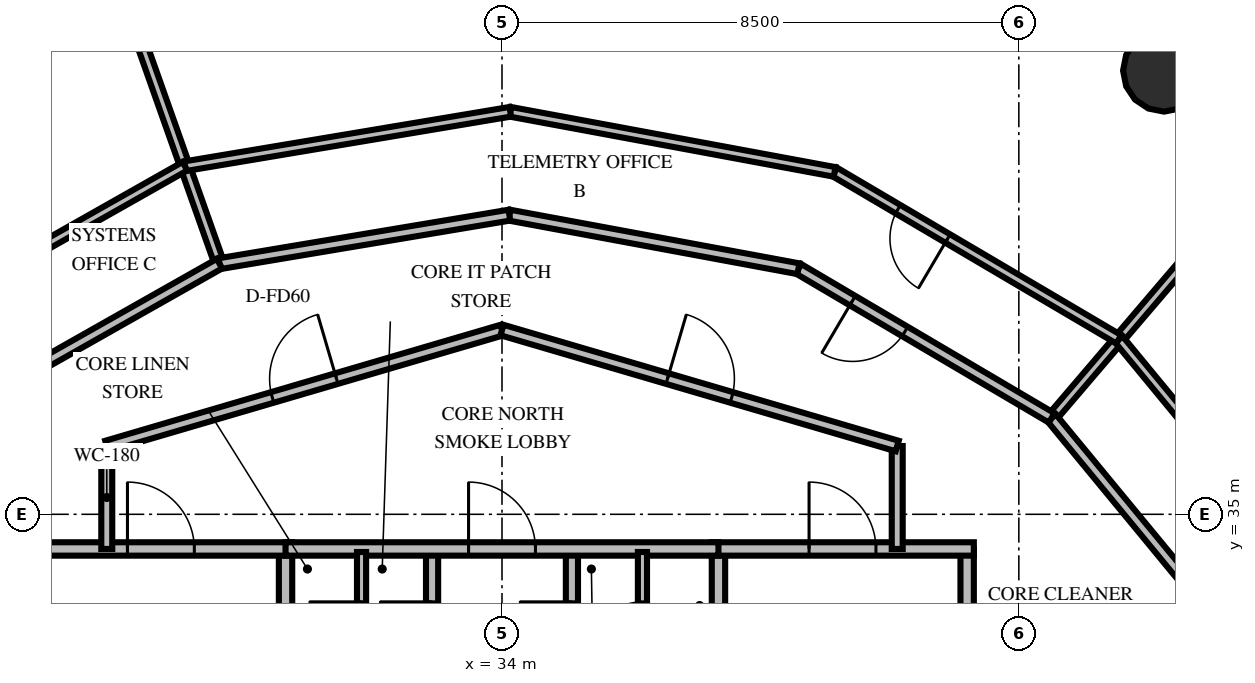
"""IFC4 building model, lengths in metres.
Left out: names, types, materials, properties, quantities, classifications, styles, units other than length and angle.
Written with IfcOpenShell. Run it as: python <this file> out.ifc"""

import sys

from ifc_helpers import new_model, si_unit, direction, frame, frame_2d, origin, origin_2d, place, context, subcontext, project, spatial, rectangle, circle, extrude, element, fill, save


model = new_model("IFC4")
c1 = context("Model", 3, precision=1e-05, world=origin(), true_north=direction((0.0, 1.0)))
c2 = subcontext(c1, "Body", "Model", "MODEL_VIEW")
j1 = project(units=[si_unit("LENGTHUNIT", "METRE"), si_unit("PLANEANGLEUNIT", "RADIAN")], contexts=[c1])
p1 = place(None, origin())
s1 = spatial("IfcSite", under=j1, at=p1, CompositionType="ELEMENT")
p2 = place(p1, origin())
s2 = spatial("IfcBuilding", under=s1, at=p2, CompositionType="ELEMENT")
p3 = place(p2, frame((0.0, 0.0, 72.0)))
s3 = spatial("IfcBuildingStorey", under=s2, at=p3, CompositionType="ELEMENT", Elevation=72.0)
p4 = place(p3, frame((44.889, 42.297, 0.0), z_axis=(0.0, 0.0, 1.0), x_axis=(1.0, 0.0, 0.0)))
e1 = element("IfcColumn", 1, at=p4, inside=s3, PredefinedType="COLUMN", context=c2, shape_type="SweptSolid", body=[
    extrude(circle(Radius=0.675, at=origin_2d()), origin(), (0.0, 0.0, 1.0), 4.2),
])
p5 = place(p3, frame((30.44, 30.05, 0.0), z_axis=(0.0, 0.0, 1.0), x_axis=(0.0, 1.0, 0.0)))
e2 = element("IfcWall", 2, at=p5, inside=s3, PredefinedType="SOLIDWALL", context=c2, shape_type="SweptSolid", body=[
    extrude(rectangle(XDim=4.38, YDim=0.22, at=frame_2d((2.19, 0.0))), origin(), (0.0, 0.0, 1.0), 3.0),
])
p6 = place(p5, frame((0.8, 0.0, 0.0)))
e3 = element("IfcOpeningElement", 3, at=p6, cuts=e2, PredefinedType="OPENING", context=c2, shape_type="SweptSolid", body=[
    extrude(rectangle(XDim=1.05, YDim=2.1, at=frame_2d((0.525, 1.05))), frame((0.0, 0.12, 0.0), z_axis=(0.0, -1.0, 0.0), x_axis=(1.0, 0.0, 0.0)), (0.0, 0.0, 1.0), 0.24),
])
p7 = place(p3, frame((26.24, 34.43, 0.0), z_axis=(0.0, 0.0, 1.0), x_axis=(1.0, 0.0, 0.0)))
e4 = element("IfcWall", 4, at=p7, inside=s3, PredefinedType="SOLIDWALL", context=c2, shape_type="SweptSolid", body=[
    extrude(rectangle(XDim=4.31, YDim=0.22, at=frame_2d((2.155, 0.0))), origin(), (0.0, 0.0, 1.0), 3.0),
])
p8 = place(p7, frame((1.6, 0.0, 0.0)))
e5 = element("IfcOpeningElement", 5, at=p8, cuts=e4, PredefinedType="OPENING", context=c2, shape_type="SweptSolid", body=[
    extrude(rectangle(XDim=1.1, YDim=2.15, at=frame_2d((0.55, 1.075))), frame((0.0, 0.12, 0.0), z_axis=(0.0, -1.0, 0.0), x_axis=(1.0, 0.0, 0.0)), (0.0, 0.0, 1.0), 0.24),
])
p9 = place(p3, frame((32.85, 30.05, 0.0), z_axis=(0.0, 0.0, 1.0), x_axis=(0.0, 1.0, 0.0)))
e6 = element("IfcWall", 6, at=p9, inside=s3, PredefinedType="SOLIDWALL", context=c2, shape_type="SweptSolid", body=[
    extrude(rectangle(XDim=4.38, YDim=0.2, at=frame_2d((2.19, 0.0))), origin(), (0.0, 0.0, 1.0), 3.0),
])
p10 = place(p9, frame((2.65, 0.0, 0.0)))
e7 = element("IfcOpeningElement", 7, at=p10, cuts=e6, PredefinedType="OPENING", context=c2, shape_type="SweptSolid", body=[
    extrude(rectangle(XDim=0.86, YDim=2.05, at=frame_2d((0.43, 1.025))), frame((0.0, 0.11, 0.0), z_axis=(0.0, -1.0, 0.0), x_axis=(1.0, 0.0, 0.0)), (0.0, 0.0, 1.0), 0.22),
])
p11 = place(p3, frame((37.56, 30.05, 0.0), z_axis=(0.0, 0.0, 1.0), x_axis=(0.0, 1.0, 0.0)))
e8 = element("IfcWall", 8, at=p11, inside=s3, PredefinedType="SOLIDWALL", context=c2, shape_type="SweptSolid", body=[
    extrude(rectangle(XDim=4.38, YDim=0.22, at=frame_2d((2.19, 0.0))), origin(), (0.0, 0.0, 1.0), 3.0),
])
p12 = place(p11, frame((0.8, 0.0, 0.0)))
e9 = element("IfcOpeningElement", 9, at=p12, cuts=e8, PredefinedType="OPENING", context=c2, shape_type="SweptSolid", body=[
    extrude(rectangle(XDim=1.05, YDim=2.1, at=frame_2d((0.525, 1.05))), frame((0.0, 0.12, 0.0), z_axis=(0.0, -1.0, 0.0), x_axis=(1.0, 0.0, 0.0)), (0.0, 0.0, 1.0), 0.24),
])
p13 = place(p3, frame((41.65, 30.05, 0.0), z_axis=(0.0, 0.0, 1.0), x_axis=(0.0, 1.0, 0.0)))
e10 = element("IfcWall", 10, at=p13, inside=s3, PredefinedType="SOLIDWALL", context=c2, shape_type="SweptSolid", body=[
    extrude(rectangle(XDim=4.38, YDim=0.22, at=frame_2d((2.19, 0.0))), origin(), (0.0, 0.0, 1.0), 3.0),
])
p14 = place(p3, frame((37.45, 34.43, 0.0), z_axis=(0.0, 0.0, 1.0), x_axis=(1.0, 0.0, 0.0)))
e11 = element("IfcWall", 11, at=p14, inside=s3, PredefinedType="SOLIDWALL", context=c2, shape_type="SweptSolid", body=[
    extrude(rectangle(XDim=4.31, YDim=0.22, at=frame_2d((2.155, 0.0))), origin(), (0.0, 0.0, 1.0), 3.0),
])
p15 = place(p14, frame((1.6, 0.0, 0.0)))
e12 = element("IfcOpeningElement", 12, at=p15, cuts=e11, PredefinedType="OPENING", context=c2, shape_type="SweptSolid", body=[
    extrude(rectangle(XDim=1.1, YDim=2.15, at=frame_2d((0.55, 1.075))), frame((0.0, 0.12, 0.0), z_axis=(0.0, -1.0, 0.0), x_axis=(1.0, 0.0, 0.0)), (0.0, 0.0, 1.0), 0.24),
])
p16 = place(p3, frame((35.15, 30.05, 0.0), z_axis=(0.0, 0.0, 1.0), x_axis=(0.0, 1.0, 0.0)))
e13 = element("IfcWall", 13, at=p16, inside=s3, PredefinedType="SOLIDWALL", context=c2, shape_type="SweptSolid", body=[
    extrude(rectangle(XDim=4.38, YDim=0.2, at=frame_2d((2.19, 0.0))), origin(), (0.0, 0.0, 1.0), 3.0),
])
p17 = place(p16, frame((2.65, 0.0, 0.0)))
e14 = element("IfcOpeningElement", 14, at=p17, cuts=e13, PredefinedType="OPENING", context=c2, shape_type="SweptSolid", body=[
    extrude(rectangle(XDim=0.86, YDim=2.05, at=frame_2d((0.43, 1.025))), frame((0.0, 0.11, 0.0), z_axis=(0.0, -1.0, 0.0), x_axis=(1.0, 0.0, 0.0)), (0.0, 0.0, 1.0), 0.22),
])
p18 = place(p3, frame((30.44, 34.43, 0.0), z_axis=(0.0, 0.0, 1.0), x_axis=(1.0, 0.0, 0.0)))
e15 = element("IfcWall", 15, at=p18, inside=s3, PredefinedType="SOLIDWALL", context=c2, shape_type="SweptSolid", body=[
    extrude(rectangle(XDim=7.12, YDim=0.22, at=frame_2d((3.56, 0.0))), origin(), (0.0, 0.0, 1.0), 3.0),
])
p19 = place(p18, frame((3.01, 0.0, 0.0)))
e16 = element("IfcOpeningElement", 16, at=p19, cuts=e15, PredefinedType="OPENING", context=c2, shape_type="SweptSolid", body=[
    extrude(rectangle(XDim=1.1, YDim=2.15, at=frame_2d((0.55, 1.075))), frame((0.0, 0.12, 0.0), z_axis=(0.0, -1.0, 0.0), x_axis=(1.0, 0.0, 0.0)), (0.0, 0.0, 1.0), 0.24),
])
p20 = place(p3, frame((31.69, 32.05, 0.0), z_axis=(0.0, 0.0, 1.0), x_axis=(0.0, 1.0, 0.0)))
e17 = element("IfcWall", 17, at=p20, inside=s3, PredefinedType="PARTITIONING", context=c2, shape_type="SweptSolid", body=[
    extrude(rectangle(XDim=2.33, YDim=0.15, at=frame_2d((1.165, 0.0))), origin(), (0.0, 0.0, 1.0), 3.0),
])
p21 = place(p20, frame((0.65, 0.0, 0.0)))
e18 = element("IfcOpeningElement", 18, at=p21, cuts=e17, PredefinedType="OPENING", context=c2, shape_type="SweptSolid", body=[
    extrude(rectangle(XDim=0.86, YDim=2.05, at=frame_2d((0.43, 1.025))), frame((0.0, 0.085, 0.0), z_axis=(0.0, -1.0, 0.0), x_axis=(1.0, 0.0, 0.0)), (0.0, 0.0, 1.0), 0.17),
])
p22 = place(p3, frame((36.31, 32.05, 0.0), z_axis=(0.0, 0.0, 1.0), x_axis=(0.0, 1.0, 0.0)))
e19 = element("IfcWall", 19, at=p22, inside=s3, PredefinedType="PARTITIONING", context=c2, shape_type="SweptSolid", body=[
    extrude(rectangle(XDim=2.33, YDim=0.15, at=frame_2d((1.165, 0.0))), origin(), (0.0, 0.0, 1.0), 3.0),
])
p23 = place(p22, frame((0.65, 0.0, 0.0)))
e20 = element("IfcOpeningElement", 20, at=p23, cuts=e19, PredefinedType="OPENING", context=c2, shape_type="SweptSolid", body=[
    extrude(rectangle(XDim=0.86, YDim=2.05, at=frame_2d((0.43, 1.025))), frame((0.0, 0.085, 0.0), z_axis=(0.0, -1.0, 0.0), x_axis=(1.0, 0.0, 0.0)), (0.0, 0.0, 1.0), 0.17),
])
for number, where, z_axis, x_axis in (
    (21, (27.5, 34.43, 0.0), (0.0, 0.0, 1.0), (0.0, 1.0, 0.0)),
    (22, (40.5, 36.123, 0.0), (0.0, 0.0, 1.0), (0.0, -1.0, 0.0)),
):
    element("IfcWall", number, at=place(p3, frame(where, z_axis=z_axis, x_axis=x_axis)), inside=s3, PredefinedType="PARTITIONING", context=c2, shape_type="SweptSolid", body=[
        extrude(rectangle(XDim=1.693, YDim=0.18, at=frame_2d((0.846, 0.0))), origin(), (0.0, 0.0, 1.0), 3.0),
    ])
p24 = place(p3, frame((27.5, 36.123, 0.0), z_axis=(0.0, 0.0, 1.0), x_axis=(0.959546654541, 0.281549671923, 0.0)))
e23 = element("IfcWall", 23, at=p24, inside=s3, PredefinedType="PARTITIONING", context=c2, shape_type="SweptSolid", body=[
    extrude(rectangle(XDim=6.774, YDim=0.18, at=frame_2d((3.387, 0.0))), origin(), (0.0, 0.0, 1.0), 3.0),
])
p25 = place(p24, frame((2.837, 0.0, 0.0)))
e24 = element("IfcOpeningElement", 24, at=p25, cuts=e23, PredefinedType="OPENING", context=c2, shape_type="SweptSolid", body=[
    extrude(rectangle(XDim=1.1, YDim=2.15, at=frame_2d((0.55, 1.075))), frame((0.0, 0.1, 0.0), z_axis=(0.0, -1.0, 0.0), x_axis=(1.0, 0.0, 0.0)), (0.0, 0.0, 1.0), 0.2),
])
p26 = place(p3, frame((34.0, 38.03, 0.0), z_axis=(0.0, 0.0, 1.0), x_axis=(0.959546654541, -0.281549671923, 0.0)))
e25 = element("IfcWall", 25, at=p26, inside=s3, PredefinedType="PARTITIONING", context=c2, shape_type="SweptSolid", body=[
    extrude(rectangle(XDim=6.774, YDim=0.18, at=frame_2d((3.387, 0.0))), origin(), (0.0, 0.0, 1.0), 3.0),
])
p27 = place(p26, frame((2.837, 0.0, 0.0)))
e26 = element("IfcOpeningElement", 26, at=p27, cuts=e25, PredefinedType="OPENING", context=c2, shape_type="SweptSolid", body=[
    extrude(rectangle(XDim=1.1, YDim=2.15, at=frame_2d((0.55, 1.075))), frame((0.0, 0.1, 0.0), z_axis=(0.0, -1.0, 0.0), x_axis=(1.0, 0.0, 0.0)), (0.0, 0.0, 1.0), 0.2),
])
p28 = place(p3, frame((43.04, 36.585, 0.0), z_axis=(0.0, 0.0, 1.0), x_axis=(0.649446826372, 0.760407009249, 0.0)))
e27 = element("IfcWall", 27, at=p28, inside=s3, PredefinedType="PARTITIONING", context=c2, shape_type="SweptSolid", body=[
    extrude(rectangle(XDim=10.55, YDim=0.16, at=frame_2d((5.275, 0.0))), origin(), (0.0, 0.0, 1.0), 3.0),
])
p29 = place(p3, frame((46.115, 32.854, 0.0), z_axis=(0.0, 0.0, 1.0), x_axis=(-0.636082430418, 0.771621112797, 0.0)))
e28 = element("IfcWall", 28, at=p29, inside=s3, PredefinedType="PARTITIONING", context=c2, shape_type="SweptSolid", body=[
    extrude(rectangle(XDim=4.834, YDim=0.18, at=frame_2d((2.417, 0.0))), origin(), (0.0, 0.0, 1.0), 3.0),
])
p30 = place(p3, frame((47.595, 33.692, 0.0), z_axis=(0.0, 0.0, 1.0), x_axis=(-0.636098388539, 0.771607957514, 0.0)))
e29 = element("IfcWall", 29, at=p30, inside=s3, PredefinedType="PARTITIONING", context=c2, shape_type="SweptSolid", body=[
    extrude(rectangle(XDim=5.425, YDim=0.16, at=frame_2d((2.712, 0.0))), origin(), (0.0, 0.0, 1.0), 3.0),
])
p31 = place(p3, frame((29.354, 39.122, 0.0), z_axis=(0.0, 0.0, 1.0), x_axis=(-0.333815866185, 0.942638301515, 0.0)))
e30 = element("IfcWall", 30, at=p31, inside=s3, PredefinedType="PARTITIONING", context=c2, shape_type="SweptSolid", body=[
    extrude(rectangle(XDim=7.514, YDim=0.16, at=frame_2d((3.757, 0.0))), origin(), (0.0, 0.0, 1.0), 3.0),
])
p32 = place(p3, frame((43.04, 36.585, 0.0), z_axis=(0.0, 0.0, 1.0), x_axis=(-0.861622469099, 0.507549722434, 0.0)))
e31 = element("IfcWall", 31, at=p32, inside=s3, PredefinedType="PARTITIONING", context=c2, shape_type="SweptSolid", body=[
    extrude(rectangle(XDim=4.834, YDim=0.18, at=frame_2d((2.417, 0.0))), origin(), (0.0, 0.0, 1.0), 3.0),
])
p33 = place(p32, frame((2.801, 0.0, 0.0)))
e32 = element("IfcOpeningElement", 32, at=p33, cuts=e31, PredefinedType="OPENING", context=c2, shape_type="SweptSolid", body=[
    extrude(rectangle(XDim=1.0, YDim=2.15, at=frame_2d((0.5, 1.075))), frame((0.0, 0.1, 0.0), z_axis=(0.0, -1.0, 0.0), x_axis=(1.0, 0.0, 0.0)), (0.0, 0.0, 1.0), 0.2),
])
p34 = place(p3, frame((38.875, 39.039, 0.0), z_axis=(0.0, 0.0, 1.0), x_axis=(-0.983259895059, 0.182208613322, 0.0)))
e33 = element("IfcWall", 33, at=p34, inside=s3, PredefinedType="PARTITIONING", context=c2, shape_type="SweptSolid", body=[
    extrude(rectangle(XDim=4.834, YDim=0.18, at=frame_2d((2.417, 0.0))), origin(), (0.0, 0.0, 1.0), 3.0),
])
p35 = place(p3, frame((34.122, 39.919, 0.0), z_axis=(0.0, 0.0, 1.0), x_axis=(-0.986287255142, -0.165037724004, 0.0)))
e34 = element("IfcWall", 34, at=p35, inside=s3, PredefinedType="PARTITIONING", context=c2, shape_type="SweptSolid", body=[
    extrude(rectangle(XDim=4.834, YDim=0.18, at=frame_2d((2.417, 0.0))), origin(), (0.0, 0.0, 1.0), 3.0),
])
p36 = place(p3, frame((44.144, 37.877, 0.0), z_axis=(0.0, 0.0, 1.0), x_axis=(-0.861614730764, 0.507562858896, 0.0)))
e35 = element("IfcWall", 35, at=p36, inside=s3, PredefinedType="PARTITIONING", context=c2, shape_type="SweptSolid", body=[
    extrude(rectangle(XDim=5.425, YDim=0.16, at=frame_2d((2.712, 0.0))), origin(), (0.0, 0.0, 1.0), 3.0),
])
p37 = place(p36, frame((3.266, 0.0, 0.0)))
e36 = element("IfcOpeningElement", 36, at=p37, cuts=e35, PredefinedType="OPENING", context=c2, shape_type="SweptSolid", body=[
    extrude(rectangle(XDim=0.95, YDim=2.15, at=frame_2d((0.475, 1.075))), frame((0.0, 0.09, 0.0), z_axis=(0.0, -1.0, 0.0), x_axis=(1.0, 0.0, 0.0)), (0.0, 0.0, 1.0), 0.18),
])
for number, where, z_axis, x_axis in (
    (37, (39.47, 40.631, 0.0), (0.0, 0.0, 1.0), (-0.983, 0.182, 0.0)),
    (38, (34.136, 41.619, 0.0), (0.0, 0.0, 1.0), (-0.986, -0.165, 0.0)),
):
    element("IfcWall", number, at=place(p3, frame(where, z_axis=z_axis, x_axis=x_axis)), inside=s3, PredefinedType="PARTITIONING", context=c2, shape_type="SweptSolid", body=[
        extrude(rectangle(XDim=5.425, YDim=0.16, at=frame_2d((2.712, 0.0))), origin(), (0.0, 0.0, 1.0), 3.0),
    ])
p38 = place(p3, frame((29.354, 39.122, 0.0), z_axis=(0.0, 0.0, 1.0), x_axis=(-0.870357726762, -0.492419970621, 0.0)))
e39 = element("IfcWall", 39, at=p38, inside=s3, PredefinedType="PARTITIONING", context=c2, shape_type="SweptSolid", body=[
    extrude(rectangle(XDim=4.834, YDim=0.18, at=frame_2d((2.417, 0.0))), origin(), (0.0, 0.0, 1.0), 3.0),
])
p39 = place(p3, frame((28.786, 40.724, 0.0), z_axis=(0.0, 0.0, 1.0), x_axis=(-0.870345661177, -0.492441296065, 0.0)))
e40 = element("IfcWall", 40, at=p39, inside=s3, PredefinedType="PARTITIONING", context=c2, shape_type="SweptSolid", body=[
    extrude(rectangle(XDim=5.425, YDim=0.16, at=frame_2d((2.712, 0.0))), origin(), (0.0, 0.0, 1.0), 3.0),
])
p40 = place(p8, origin())
e41 = element("IfcDoor", 41, at=p40, inside=s3, OperationType="SINGLE_SWING_LEFT", PredefinedType="DOOR", context=c2, shape_type="SweptSolid", body=[
    extrude(rectangle(XDim=1.1, YDim=2.15, at=frame_2d((0.55, 1.075))), frame((0.0, 0.025, 0.0), z_axis=(0.0, -1.0, 0.0), x_axis=(1.0, 0.0, 0.0)), (0.0, 0.0, 1.0), 0.05),
])
fill(e5, e41)
p41 = place(p10, origin())
e42 = element("IfcDoor", 42, at=p41, inside=s3, OperationType="SINGLE_SWING_RIGHT", PredefinedType="TRAPDOOR", context=c2, shape_type="SweptSolid", body=[
    extrude(rectangle(XDim=0.86, YDim=2.05, at=frame_2d((0.43, 1.025))), frame((0.0, 0.025, 0.0), z_axis=(0.0, -1.0, 0.0), x_axis=(1.0, 0.0, 0.0)), (0.0, 0.0, 1.0), 0.05),
])
fill(e7, e42)
p42 = place(p15, origin())
e43 = element("IfcDoor", 43, at=p42, inside=s3, OperationType="SINGLE_SWING_LEFT", PredefinedType="DOOR", context=c2, shape_type="SweptSolid", body=[
    extrude(rectangle(XDim=1.1, YDim=2.15, at=frame_2d((0.55, 1.075))), frame((0.0, 0.025, 0.0), z_axis=(0.0, -1.0, 0.0), x_axis=(1.0, 0.0, 0.0)), (0.0, 0.0, 1.0), 0.05),
])
fill(e12, e43)
p43 = place(p17, origin())
e44 = element("IfcDoor", 44, at=p43, inside=s3, OperationType="SINGLE_SWING_RIGHT", PredefinedType="TRAPDOOR", context=c2, shape_type="SweptSolid", body=[
    extrude(rectangle(XDim=0.86, YDim=2.05, at=frame_2d((0.43, 1.025))), frame((0.0, 0.025, 0.0), z_axis=(0.0, -1.0, 0.0), x_axis=(1.0, 0.0, 0.0)), (0.0, 0.0, 1.0), 0.05),
])
fill(e14, e44)
p44 = place(p19, origin())
e45 = element("IfcDoor", 45, at=p44, inside=s3, OperationType="SINGLE_SWING_LEFT", PredefinedType="DOOR", context=c2, shape_type="SweptSolid", body=[
    extrude(rectangle(XDim=1.1, YDim=2.15, at=frame_2d((0.55, 1.075))), frame((0.0, 0.025, 0.0), z_axis=(0.0, -1.0, 0.0), x_axis=(1.0, 0.0, 0.0)), (0.0, 0.0, 1.0), 0.05),
])
fill(e16, e45)
p45 = place(p21, origin())
e46 = element("IfcDoor", 46, at=p45, inside=s3, OperationType="SINGLE_SWING_RIGHT", PredefinedType="TRAPDOOR", context=c2, shape_type="SweptSolid", body=[
    extrude(rectangle(XDim=0.86, YDim=2.05, at=frame_2d((0.43, 1.025))), frame((0.0, 0.025, 0.0), z_axis=(0.0, -1.0, 0.0), x_axis=(1.0, 0.0, 0.0)), (0.0, 0.0, 1.0), 0.05),
])
fill(e18, e46)
p46 = place(p23, origin())
e47 = element("IfcDoor", 47, at=p46, inside=s3, OperationType="SINGLE_SWING_LEFT", PredefinedType="TRAPDOOR", context=c2, shape_type="SweptSolid", body=[
    extrude(rectangle(XDim=0.86, YDim=2.05, at=frame_2d((0.43, 1.025))), frame((0.0, 0.025, 0.0), z_axis=(0.0, -1.0, 0.0), x_axis=(1.0, 0.0, 0.0)), (0.0, 0.0, 1.0), 0.05),
])
fill(e20, e47)
p47 = place(p25, origin())
e48 = element("IfcDoor", 48, at=p47, inside=s3, OperationType="SINGLE_SWING_RIGHT", PredefinedType="DOOR", context=c2, shape_type="SweptSolid", body=[
    extrude(rectangle(XDim=1.1, YDim=2.15, at=frame_2d((0.55, 1.075))), frame((0.0, 0.025, 0.0), z_axis=(0.0, -1.0, 0.0), x_axis=(1.0, 0.0, 0.0)), (0.0, 0.0, 1.0), 0.05),
])
fill(e24, e48)
p48 = place(p27, origin())
e49 = element("IfcDoor", 49, at=p48, inside=s3, OperationType="SINGLE_SWING_LEFT", PredefinedType="DOOR", context=c2, shape_type="SweptSolid", body=[
    extrude(rectangle(XDim=1.1, YDim=2.15, at=frame_2d((0.55, 1.075))), frame((0.0, 0.025, 0.0), z_axis=(0.0, -1.0, 0.0), x_axis=(1.0, 0.0, 0.0)), (0.0, 0.0, 1.0), 0.05),
])
fill(e26, e49)
p49 = place(p33, origin())
e50 = element("IfcDoor", 50, at=p49, inside=s3, OperationType="SINGLE_SWING_RIGHT", PredefinedType="DOOR", context=c2, shape_type="SweptSolid", body=[
    extrude(rectangle(XDim=1.0, YDim=2.15, at=frame_2d((0.5, 1.075))), frame((0.0, 0.025, 0.0), z_axis=(0.0, -1.0, 0.0), x_axis=(1.0, 0.0, 0.0)), (0.0, 0.0, 1.0), 0.05),
])
fill(e32, e50)
p50 = place(p37, origin())
e51 = element("IfcDoor", 51, at=p50, inside=s3, OperationType="SINGLE_SWING_LEFT", PredefinedType="DOOR", context=c2, shape_type="SweptSolid", body=[
    extrude(rectangle(XDim=0.95, YDim=2.15, at=frame_2d((0.475, 1.075))), frame((0.0, 0.025, 0.0), z_axis=(0.0, -1.0, 0.0), x_axis=(1.0, 0.0, 0.0)), (0.0, 0.0, 1.0), 0.05),
])
fill(e36, e51)
save(model, sys.argv[1])
